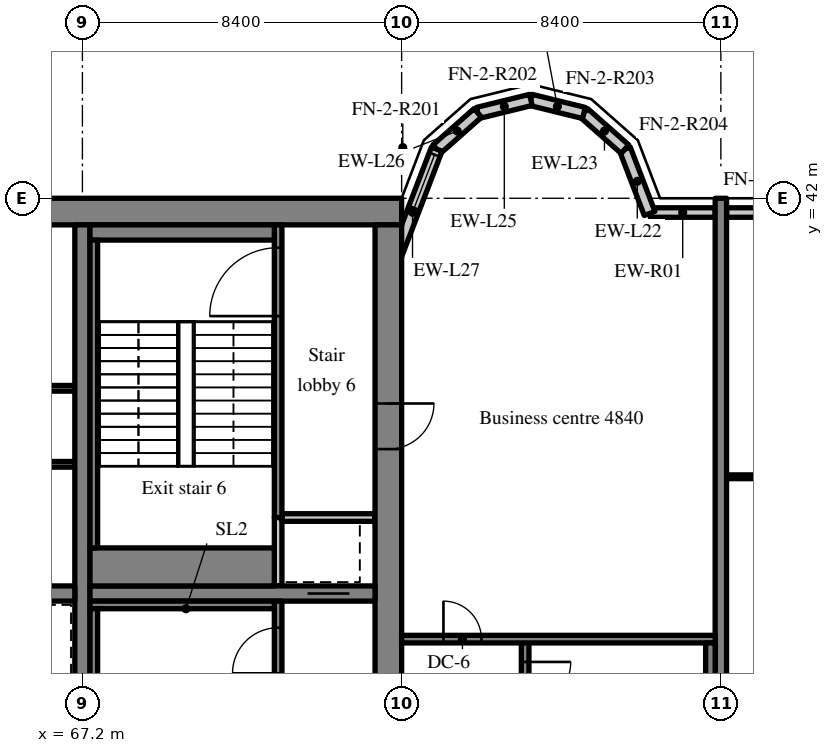
"""IFC4 building model, lengths in metres.
Left out: names, types, materials, properties, quantities, classifications, styles, units other than length and angle.
Written with IfcOpenShell. Run it as: python <this file> out.ifc"""

import sys

from ifc_helpers import new_model, si_unit, direction, frame, frame_2d, origin, place, context, subcontext, project, spatial, rectangle, extrude, source, transform, mapped, element, fill, save


model = new_model("IFC4")
c1 = context("Model", 3, precision=1e-05, world=origin(), true_north=direction((0.0, 1.0)))
c2 = subcontext(c1, "Body", "Model", "MODEL_VIEW")
j1 = project(units=[si_unit("LENGTHUNIT", "METRE"), si_unit("PLANEANGLEUNIT", "RADIAN")], contexts=[c1])
p1 = place(None, origin())
s1 = spatial("IfcSite", under=j1, at=p1, CompositionType="ELEMENT")
p2 = place(p1, origin())
s2 = spatial("IfcBuilding", under=s1, at=p2, CompositionType="ELEMENT")
p3 = place(p2, frame((0.0, 0.0, 197.2)))
s3 = spatial("IfcBuildingStorey", under=s2, at=p3, CompositionType="ELEMENT", Elevation=197.2)
m1 = source(origin(), c2, "Body", "SweptSolid", [
    extrude(rectangle(XDim=50.4, YDim=0.7, at=frame_2d((25.2, 0.0))), origin(), (0.0, 0.0, 1.0), 3.52),
])
p4 = place(p3, frame((25.2, 41.65, 0.0), z_axis=(0.0, 0.0, 1.0), x_axis=(1.0, 0.0, 0.0)))
e1 = element("IfcWall", 1, at=p4, inside=s3, PredefinedType="SHEAR", context=c2, shape_type="MappedRepresentation", body=[
    mapped(m1, transform((0.0, 0.0, 0.0), scale=1.0)),
])
m2 = source(origin(), c2, "Body", "SweptSolid", [
    extrude(rectangle(XDim=18.6, YDim=0.7, at=frame_2d((9.3, 0.0))), origin(), (0.0, 0.0, 1.0), 3.52),
])
p5 = place(p3, frame((75.25, 22.7, 0.0), z_axis=(0.0, 0.0, 1.0), x_axis=(0.0, 1.0, 0.0)))
e2 = element("IfcWall", 2, at=p5, inside=s3, PredefinedType="SHEAR", context=c2, shape_type="MappedRepresentation", body=[
    mapped(m2, transform((0.0, 0.0, 0.0), scale=1.0)),
])
m3 = source(origin(), c2, "Body", "SweptSolid", [
    extrude(rectangle(XDim=1.2, YDim=2.1, at=frame_2d((0.6, 1.05))), frame((0.0, 0.36, 0.0), z_axis=(0.0, -1.0, 0.0), x_axis=(1.0, 0.0, 0.0)), (0.0, 0.0, 1.0), 0.72),
])
p6 = place(p5, frame((12.7, 0.0, 0.0)))
e3 = element("IfcOpeningElement", 3, at=p6, cuts=e2, PredefinedType="OPENING", context=c2, shape_type="MappedRepresentation", body=[
    mapped(m3, transform((0.0, 0.0, 0.0), scale=1.0)),
])
m4 = source(origin(), c2, "Body", "SweptSolid", [
    extrude(rectangle(XDim=18.6, YDim=0.4, at=frame_2d((9.3, 0.0))), origin(), (0.0, 0.0, 1.0), 3.52),
])
p7 = place(p3, frame((67.2, 22.7, 0.0), z_axis=(0.0, 0.0, 1.0), x_axis=(0.0, 1.0, 0.0)))
e4 = element("IfcWall", 4, at=p7, inside=s3, PredefinedType="SHEAR", context=c2, shape_type="MappedRepresentation", body=[
    mapped(m4, transform((0.0, 0.0, 0.0), scale=1.0)),
])
m5 = source(origin(), c2, "Body", "SweptSolid", [
    extrude(rectangle(XDim=16.4, YDim=0.4, at=frame_2d((8.2, 0.0))), origin(), (0.0, 0.0, 1.0), 3.52),
])
p8 = place(p3, frame((50.6, 31.6, 0.0), z_axis=(0.0, 0.0, 1.0), x_axis=(1.0, 0.0, 0.0)))
e5 = element("IfcWall", 5, at=p8, inside=s3, PredefinedType="SHEAR", context=c2, shape_type="MappedRepresentation", body=[
    mapped(m5, transform((0.0, 0.0, 0.0), scale=1.0)),
])
m6 = source(origin(), c2, "Body", "SweptSolid", [
    extrude(rectangle(XDim=1.0, YDim=2.1, at=frame_2d((0.5, 1.05))), frame((0.0, 0.21, 0.0), z_axis=(0.0, -1.0, 0.0), x_axis=(1.0, 0.0, 0.0)), (0.0, 0.0, 1.0), 0.42),
])
p9 = place(p8, frame((0.6, 0.0, 0.0)))
e6 = element("IfcOpeningElement", 6, at=p9, cuts=e5, PredefinedType="OPENING", context=c2, shape_type="MappedRepresentation", body=[
    mapped(m6, transform((0.0, 0.0, 0.0), scale=1.0)),
])
m7 = source(origin(), c2, "Body", "SweptSolid", [
    extrude(rectangle(XDim=7.5, YDim=0.4, at=frame_2d((3.75, 0.0))), origin(), (0.0, 0.0, 1.0), 3.52),
])
p10 = place(p3, frame((67.4, 31.6, 0.0), z_axis=(0.0, 0.0, 1.0), x_axis=(1.0, 0.0, 0.0)))
e7 = element("IfcWall", 7, at=p10, inside=s3, PredefinedType="SHEAR", context=c2, shape_type="MappedRepresentation", body=[
    mapped(m7, transform((0.0, 0.0, 0.0), scale=1.0)),
])
m8 = source(origin(), c2, "Body", "SweptSolid", [
    extrude(rectangle(XDim=1.1, YDim=2.1, at=frame_2d((0.55, 1.05))), frame((0.0, 0.21, 0.0), z_axis=(0.0, -1.0, 0.0), x_axis=(1.0, 0.0, 0.0)), (0.0, 0.0, 1.0), 0.42),
])
p11 = place(p10, frame((5.725, 0.0, 0.0)))
e8 = element("IfcOpeningElement", 8, at=p11, cuts=e7, PredefinedType="OPENING", context=c2, shape_type="MappedRepresentation", body=[
    mapped(m8, transform((0.0, 0.0, 0.0), scale=1.0)),
])
m9 = source(origin(), c2, "Body", "SweptSolid", [
    extrude(rectangle(XDim=20.0, YDim=0.3, at=frame_2d((10.0, 0.0))), origin(), (0.0, 0.0, 1.0), 3.52),
])
p12 = place(p3, frame((84.0, 22.0, 0.0), z_axis=(0.0, 0.0, 1.0), x_axis=(0.0, 1.0, 0.0)))
e9 = element("IfcWall", 9, at=p12, inside=s3, PredefinedType="SHEAR", context=c2, shape_type="MappedRepresentation", body=[
    mapped(m9, transform((0.0, 0.0, 0.0), scale=1.0)),
])
m10 = source(origin(), c2, "Body", "SweptSolid", [
    extrude(rectangle(XDim=1.708, YDim=0.25, at=frame_2d((0.854, 0.0))), origin(), (0.0, 0.0, 1.0), 2.87),
])
p13 = place(p3, frame((83.85, 41.625, 0.0), z_axis=(0.0, 0.0, 1.0), x_axis=(-1.0, 0.0, 0.0)))
e10 = element("IfcWall", 10, at=p13, inside=s3, PredefinedType="SOLIDWALL", context=c2, shape_type="MappedRepresentation", body=[
    mapped(m10, transform((0.0, 0.0, 0.0), scale=1.0)),
])
m11 = source(origin(), c2, "Body", "SweptSolid", [
    extrude(rectangle(XDim=4.095, YDim=0.25, at=frame_2d((2.047, 0.0))), origin(), (0.0, 0.0, 1.0), 2.87),
])
p14 = place(p3, frame((88.245, 41.625, 0.0), z_axis=(0.0, 0.0, 1.0), x_axis=(-1.0, 0.0, 0.0)))
e11 = element("IfcWall", 11, at=p14, inside=s3, PredefinedType="SOLIDWALL", context=c2, shape_type="MappedRepresentation", body=[
    mapped(m11, transform((0.0, 0.0, 0.0), scale=1.0)),
])
m12 = source(origin(), c2, "Body", "SweptSolid", [
    extrude(rectangle(XDim=1.5, YDim=1.5, at=frame_2d((0.75, 0.75))), frame((0.0, 0.135, 0.0), z_axis=(0.0, -1.0, 0.0), x_axis=(1.0, 0.0, 0.0)), (0.0, 0.0, 1.0), 0.27),
])
p15 = place(p14, frame((1.297, 0.0, 0.9)))
e12 = element("IfcOpeningElement", 12, at=p15, cuts=e11, PredefinedType="OPENING", context=c2, shape_type="MappedRepresentation", body=[
    mapped(m12, transform((0.0, 0.0, 0.0), scale=1.0)),
])
m13 = source(origin(), c2, "Body", "SweptSolid", [
    extrude(rectangle(XDim=1.812, YDim=0.3, at=frame_2d((0.906, 0.0))), origin(), (0.0, 0.0, 1.0), 3.52),
])
p16 = place(p3, frame((82.125, 41.6, 0.0), z_axis=(0.0, 0.0, 1.0), x_axis=(-0.357877270961, 0.93376863244, 0.0)))
e13 = element("IfcWall", 13, at=p16, inside=s3, PredefinedType="SOLIDWALL", context=c2, shape_type="MappedRepresentation", body=[
    mapped(m13, transform((0.0, 0.0, 0.0), scale=1.0)),
])
m14 = source(origin(), c2, "Body", "SweptSolid", [
    extrude(rectangle(XDim=1.44, YDim=0.3, at=frame_2d((0.72, 0.0))), origin(), (0.0, 0.0, 1.0), 3.52),
])
p17 = place(p3, frame((81.477, 43.292, 0.0), z_axis=(0.0, 0.0, 1.0), x_axis=(-0.74957555648, 0.661918790432, 0.0)))
e14 = element("IfcWall", 14, at=p17, inside=s3, PredefinedType="SOLIDWALL", context=c2, shape_type="MappedRepresentation", body=[
    mapped(m14, transform((0.0, 0.0, 0.0), scale=1.0)),
])
m15 = source(origin(), c2, "Body", "SweptSolid", [
    extrude(rectangle(XDim=1.439, YDim=0.3, at=frame_2d((0.719, 0.0))), origin(), (0.0, 0.0, 1.0), 3.52),
])
for number, where, z_axis, x_axis in (
    (15, (80.397, 44.245, 0.0), (0.0, 0.0, 1.0), (-0.971, 0.238, 0.0)),
    (16, (79.0, 44.588, 0.0), (0.0, 0.0, 1.0), (-0.971, -0.238, 0.0)),
):
    element("IfcWall", number, at=place(p3, frame(where, z_axis=z_axis, x_axis=x_axis)), inside=s3, PredefinedType="SOLIDWALL", context=c2, shape_type="MappedRepresentation", body=[
        mapped(m15, transform((0.0, 0.0, 0.0), scale=1.0)),
    ])
p18 = place(p3, frame((77.603, 44.245, 0.0), z_axis=(0.0, 0.0, 1.0), x_axis=(-0.74957555648, -0.661918790432, 0.0)))
e17 = element("IfcWall", 17, at=p18, inside=s3, PredefinedType="SOLIDWALL", context=c2, shape_type="MappedRepresentation", body=[
    mapped(m14, transform((0.0, 0.0, 0.0), scale=1.0)),
])
m16 = source(origin(), c2, "Body", "SweptSolid", [
    extrude(rectangle(XDim=3.559, YDim=0.3, at=frame_2d((1.78, 0.0))), origin(), (0.0, 0.0, 1.0), 3.52),
])
p19 = place(p3, frame((76.523, 43.292, 0.0), z_axis=(0.0, 0.0, 1.0), x_axis=(-0.35779745313, -0.933799219604, 0.0)))
e18 = element("IfcWall", 18, at=p19, inside=s3, PredefinedType="SOLIDWALL", context=c2, shape_type="MappedRepresentation", body=[
    mapped(m16, transform((0.0, 0.0, 0.0), scale=1.0)),
])
m17 = source(origin(), c2, "Body", "SweptSolid", [
    extrude(rectangle(XDim=1.5, YDim=2.0, at=frame_2d((0.75, 1.0))), frame((0.0, 0.16, 0.0), z_axis=(0.0, -1.0, 0.0), x_axis=(1.0, 0.0, 0.0)), (0.0, 0.0, 1.0), 0.32),
])
p20 = place(p19, frame((0.156, 0.0, 0.9)))
e19 = element("IfcOpeningElement", 19, at=p20, cuts=e18, PredefinedType="OPENING", context=c2, shape_type="MappedRepresentation", body=[
    mapped(m17, transform((0.0, 0.0, 0.0), scale=1.0)),
])
m18 = source(origin(), c2, "Body", "SweptSolid", [
    extrude(rectangle(XDim=14.2, YDim=0.15, at=frame_2d((7.1, 0.0))), origin(), (0.0, 0.0, 1.0), 3.52),
])
p21 = place(p3, frame((67.0, 35.0, 0.0), z_axis=(0.0, 0.0, 1.0), x_axis=(-1.0, 0.0, 0.0)))
e20 = element("IfcWall", 20, at=p21, inside=s3, PredefinedType="PARTITIONING", context=c2, shape_type="MappedRepresentation", body=[
    mapped(m18, transform((0.0, 0.0, 0.0), scale=1.0)),
])
m19 = source(origin(), c2, "Body", "SweptSolid", [
    extrude(rectangle(XDim=0.9, YDim=2.1, at=frame_2d((0.45, 1.05))), frame((0.0, 0.085, 0.0), z_axis=(0.0, -1.0, 0.0), x_axis=(1.0, 0.0, 0.0)), (0.0, 0.0, 1.0), 0.17),
])
p22 = place(p21, frame((3.434, 0.0, 0.0)))
e21 = element("IfcOpeningElement", 21, at=p22, cuts=e20, PredefinedType="OPENING", context=c2, shape_type="MappedRepresentation", body=[
    mapped(m19, transform((0.0, 0.0, 0.0), scale=1.0)),
])
p23 = place(p21, frame((10.497, 0.0, 0.0)))
e22 = element("IfcOpeningElement", 22, at=p23, cuts=e20, PredefinedType="OPENING", context=c2, shape_type="MappedRepresentation", body=[
    mapped(m19, transform((0.0, 0.0, 0.0), scale=1.0)),
])
m20 = source(origin(), c2, "Body", "SweptSolid", [
    extrude(rectangle(XDim=16.4, YDim=0.15, at=frame_2d((8.2, 0.0))), origin(), (0.0, 0.0, 1.0), 3.52),
])
p24 = place(p3, frame((67.0, 37.0, 0.0), z_axis=(0.0, 0.0, 1.0), x_axis=(-1.0, 0.0, 0.0)))
e23 = element("IfcWall", 23, at=p24, inside=s3, PredefinedType="PARTITIONING", context=c2, shape_type="MappedRepresentation", body=[
    mapped(m20, transform((0.0, 0.0, 0.0), scale=1.0)),
])
p25 = place(p24, frame((6.52, 0.0, 0.0)))
e24 = element("IfcOpeningElement", 24, at=p25, cuts=e23, PredefinedType="OPENING", context=c2, shape_type="MappedRepresentation", body=[
    mapped(m19, transform((0.0, 0.0, 0.0), scale=1.0)),
])
p26 = place(p24, frame((14.72, 0.0, 0.0)))
e25 = element("IfcOpeningElement", 25, at=p26, cuts=e23, PredefinedType="OPENING", context=c2, shape_type="MappedRepresentation", body=[
    mapped(m19, transform((0.0, 0.0, 0.0), scale=1.0)),
])
m21 = source(origin(), c2, "Body", "SweptSolid", [
    extrude(rectangle(XDim=8.7, YDim=0.2, at=frame_2d((4.35, 0.0))), origin(), (0.0, 0.0, 1.0), 3.52),
])
p27 = place(p3, frame((72.35, 22.7, 0.0), z_axis=(0.0, 0.0, 1.0), x_axis=(0.0, 1.0, 0.0)))
e26 = element("IfcWall", 26, at=p27, inside=s3, PredefinedType="SOLIDWALL", context=c2, shape_type="MappedRepresentation", body=[
    mapped(m21, transform((0.0, 0.0, 0.0), scale=1.0)),
])
m22 = source(origin(), c2, "Body", "SweptSolid", [
    extrude(rectangle(XDim=1.2, YDim=2.1, at=frame_2d((0.6, 1.05))), frame((0.0, 0.11, 0.0), z_axis=(0.0, -1.0, 0.0), x_axis=(1.0, 0.0, 0.0)), (0.0, 0.0, 1.0), 0.22),
])
p28 = place(p27, frame((6.8, 0.0, 0.0)))
e27 = element("IfcOpeningElement", 27, at=p28, cuts=e26, PredefinedType="OPENING", context=c2, shape_type="MappedRepresentation", body=[
    mapped(m22, transform((0.0, 0.0, 0.0), scale=1.0)),
])
m23 = source(origin(), c2, "Body", "SweptSolid", [
    extrude(rectangle(XDim=1.8, YDim=0.2, at=frame_2d((0.9, 0.0))), origin(), (0.0, 0.0, 1.0), 3.52),
])
p29 = place(p3, frame((72.35, 31.8, 0.0), z_axis=(0.0, 0.0, 1.0), x_axis=(0.0, 1.0, 0.0)))
e28 = element("IfcWall", 28, at=p29, inside=s3, PredefinedType="SOLIDWALL", context=c2, shape_type="MappedRepresentation", body=[
    mapped(m23, transform((0.0, 0.0, 0.0), scale=1.0)),
])
m24 = source(origin(), c2, "Body", "SweptSolid", [
    extrude(rectangle(XDim=2.45, YDim=0.2, at=frame_2d((1.225, 0.0))), origin(), (0.0, 0.0, 1.0), 3.52),
])
p30 = place(p3, frame((72.45, 33.6, 0.0), z_axis=(0.0, 0.0, 1.0), x_axis=(1.0, 0.0, 0.0)))
e29 = element("IfcWall", 29, at=p30, inside=s3, PredefinedType="SOLIDWALL", context=c2, shape_type="MappedRepresentation", body=[
    mapped(m24, transform((0.0, 0.0, 0.0), scale=1.0)),
])
m25 = source(origin(), c2, "Body", "SweptSolid", [
    extrude(rectangle(XDim=7.7, YDim=0.2, at=frame_2d((3.85, 0.0))), origin(), (0.0, 0.0, 1.0), 3.52),
])
p31 = place(p3, frame((72.35, 33.6, 0.0), z_axis=(0.0, 0.0, 1.0), x_axis=(0.0, 1.0, 0.0)))
e30 = element("IfcWall", 30, at=p31, inside=s3, PredefinedType="SOLIDWALL", context=c2, shape_type="MappedRepresentation", body=[
    mapped(m25, transform((0.0, 0.0, 0.0), scale=1.0)),
])
m26 = source(origin(), c2, "Body", "SweptSolid", [
    extrude(rectangle(XDim=1.8, YDim=2.1, at=frame_2d((0.9, 1.05))), frame((0.0, 0.11, 0.0), z_axis=(0.0, -1.0, 0.0), x_axis=(1.0, 0.0, 0.0)), (0.0, 0.0, 1.0), 0.22),
])
p32 = place(p31, frame((5.3, 0.0, 0.0)))
e31 = element("IfcOpeningElement", 31, at=p32, cuts=e30, PredefinedType="OPENING", context=c2, shape_type="MappedRepresentation", body=[
    mapped(m26, transform((0.0, 0.0, 0.0), scale=1.0)),
])
m27 = source(origin(), c2, "Body", "SweptSolid", [
    extrude(rectangle(XDim=8.3, YDim=0.2, at=frame_2d((4.15, 0.0))), origin(), (0.0, 0.0, 1.0), 3.52),
])
p33 = place(p3, frame((78.85, 22.1, 0.0), z_axis=(0.0, 0.0, 1.0), x_axis=(0.0, 1.0, 0.0)))
e32 = element("IfcWall", 32, at=p33, inside=s3, PredefinedType="SOLIDWALL", context=c2, shape_type="MappedRepresentation", body=[
    mapped(m27, transform((0.0, 0.0, 0.0), scale=1.0)),
])
p34 = place(p33, frame((6.5, 0.0, 0.0)))
e33 = element("IfcOpeningElement", 33, at=p34, cuts=e32, PredefinedType="OPENING", context=c2, shape_type="MappedRepresentation", body=[
    mapped(m22, transform((0.0, 0.0, 0.0), scale=1.0)),
])
m28 = source(origin(), c2, "Body", "SweptSolid", [
    extrude(rectangle(XDim=8.25, YDim=0.2, at=frame_2d((4.125, 0.0))), origin(), (0.0, 0.0, 1.0), 3.52),
])
p35 = place(p3, frame((83.85, 30.4, 0.0), z_axis=(0.0, 0.0, 1.0), x_axis=(-1.0, 0.0, 0.0)))
e34 = element("IfcWall", 34, at=p35, inside=s3, PredefinedType="SOLIDWALL", context=c2, shape_type="MappedRepresentation", body=[
    mapped(m28, transform((0.0, 0.0, 0.0), scale=1.0)),
])
m29 = source(origin(), c2, "Body", "SweptSolid", [
    extrude(rectangle(XDim=1.0, YDim=2.1, at=frame_2d((0.5, 1.05))), frame((0.0, 0.11, 0.0), z_axis=(0.0, -1.0, 0.0), x_axis=(1.0, 0.0, 0.0)), (0.0, 0.0, 1.0), 0.22),
])
p36 = place(p35, frame((6.15, 0.0, 0.0)))
e35 = element("IfcOpeningElement", 35, at=p36, cuts=e34, PredefinedType="OPENING", context=c2, shape_type="MappedRepresentation", body=[
    mapped(m29, transform((0.0, 0.0, 0.0), scale=1.0)),
])
m30 = source(origin(), c2, "Body", "SweptSolid", [
    extrude(rectangle(XDim=4.85, YDim=0.2, at=frame_2d((2.425, 0.0))), origin(), (0.0, 0.0, 1.0), 3.52),
])
p37 = place(p3, frame((67.4, 31.3, 0.0), z_axis=(0.0, 0.0, 1.0), x_axis=(1.0, 0.0, 0.0)))
e36 = element("IfcWall", 36, at=p37, inside=s3, PredefinedType="SOLIDWALL", context=c2, shape_type="MappedRepresentation", body=[
    mapped(m30, transform((0.0, 0.0, 0.0), scale=1.0)),
])
m31 = source(origin(), c2, "Body", "SweptSolid", [
    extrude(rectangle(XDim=8.1, YDim=0.2, at=frame_2d((4.05, 0.0))), origin(), (0.0, 0.0, 1.0), 3.52),
])
p38 = place(p3, frame((67.5, 23.1, 0.0), z_axis=(0.0, 0.0, 1.0), x_axis=(0.0, 1.0, 0.0)))
e37 = element("IfcWall", 37, at=p38, inside=s3, PredefinedType="SOLIDWALL", context=c2, shape_type="MappedRepresentation", body=[
    mapped(m31, transform((0.0, 0.0, 0.0), scale=1.0)),
])
m32 = source(origin(), c2, "Body", "SweptSolid", [
    extrude(rectangle(XDim=4.85, YDim=0.4, at=frame_2d((2.425, 0.0))), origin(), (0.0, 0.0, 1.0), 3.52),
])
p39 = place(p3, frame((67.4, 41.1, 0.0), z_axis=(0.0, 0.0, 1.0), x_axis=(1.0, 0.0, 0.0)))
e38 = element("IfcWall", 38, at=p39, inside=s3, PredefinedType="SOLIDWALL", context=c2, shape_type="MappedRepresentation", body=[
    mapped(m32, transform((0.0, 0.0, 0.0), scale=1.0)),
])
m33 = source(origin(), c2, "Body", "SweptSolid", [
    extrude(rectangle(XDim=4.85, YDim=1.0, at=frame_2d((2.425, 0.0))), origin(), (0.0, 0.0, 1.0), 3.52),
])
p40 = place(p3, frame((67.4, 32.3, 0.0), z_axis=(0.0, 0.0, 1.0), x_axis=(1.0, 0.0, 0.0)))
e39 = element("IfcWall", 39, at=p40, inside=s3, PredefinedType="SOLIDWALL", context=c2, shape_type="MappedRepresentation", body=[
    mapped(m33, transform((0.0, 0.0, 0.0), scale=1.0)),
])
p41 = place(p3, frame((67.5, 32.8, 0.0), z_axis=(0.0, 0.0, 1.0), x_axis=(0.0, 1.0, 0.0)))
e40 = element("IfcWall", 40, at=p41, inside=s3, PredefinedType="SOLIDWALL", context=c2, shape_type="MappedRepresentation", body=[
    mapped(m31, transform((0.0, 0.0, 0.0), scale=1.0)),
])
m34 = source(origin(), c2, "Body", "SweptSolid", [
    extrude(rectangle(XDim=8.1, YDim=0.25, at=frame_2d((4.05, 0.0))), origin(), (0.0, 0.0, 1.0), 3.52),
])
p42 = place(p3, frame((83.725, 22.2, 0.0), z_axis=(0.0, 0.0, 1.0), x_axis=(0.0, 1.0, 0.0)))
e41 = element("IfcWall", 41, at=p42, inside=s3, PredefinedType="SOLIDWALL", context=c2, shape_type="MappedRepresentation", body=[
    mapped(m34, transform((0.0, 0.0, 0.0), scale=1.0)),
])
m35 = source(origin(), c2, "Body", "SweptSolid", [
    extrude(rectangle(XDim=7.95, YDim=0.1, at=frame_2d((3.975, 0.0))), origin(), (0.0, 0.0, 1.0), 3.52),
])
p43 = place(p3, frame((84.15, 34.672, 0.0), z_axis=(0.0, 0.0, 1.0), x_axis=(1.0, 0.0, 0.0)))
e42 = element("IfcWall", 42, at=p43, inside=s3, PredefinedType="PARTITIONING", context=c2, shape_type="MappedRepresentation", body=[
    mapped(m35, transform((0.0, 0.0, 0.0), scale=1.0)),
])
m36 = source(origin(), c2, "Body", "SweptSolid", [
    extrude(rectangle(XDim=1.8, YDim=2.1, at=frame_2d((0.9, 1.05))), frame((0.0, 0.06, 0.0), z_axis=(0.0, -1.0, 0.0), x_axis=(1.0, 0.0, 0.0)), (0.0, 0.0, 1.0), 0.12),
])
p44 = place(p43, frame((3.075, 0.0, 0.0)))
e43 = element("IfcOpeningElement", 43, at=p44, cuts=e42, PredefinedType="OPENING", context=c2, shape_type="MappedRepresentation", body=[
    mapped(m36, transform((0.0, 0.0, 0.0), scale=1.0)),
])
m37 = source(origin(), c2, "Body", "SweptSolid", [
    extrude(rectangle(XDim=1.5, YDim=2.0, at=frame_2d((0.75, 1.0))), frame((0.0, 0.03, 0.0), z_axis=(0.0, -1.0, 0.0), x_axis=(1.0, 0.0, 0.0)), (0.0, 0.0, 1.0), 0.06),
])
p45 = place(p20, origin())
e44 = element("IfcWindow", 44, at=p45, inside=s3, PartitioningType="SINGLE_PANEL", PredefinedType="WINDOW", context=c2, shape_type="MappedRepresentation", body=[
    mapped(m37, transform((0.0, 0.0, 0.0), scale=1.0)),
])
fill(e19, e44)
m38 = source(origin(), c2, "Body", "SweptSolid", [
    extrude(rectangle(XDim=1.2, YDim=2.1, at=frame_2d((0.6, 1.05))), frame((0.0, 0.025, 0.0), z_axis=(0.0, -1.0, 0.0), x_axis=(1.0, 0.0, 0.0)), (0.0, 0.0, 1.0), 0.05),
])
p46 = place(p28, origin())
e45 = element("IfcDoor", 45, at=p46, inside=s3, OperationType="SINGLE_SWING_LEFT", PredefinedType="DOOR", context=c2, shape_type="MappedRepresentation", body=[
    mapped(m38, transform((0.0, 0.0, 0.0), scale=1.0)),
])
fill(e27, e45)
m39 = source(origin(), c2, "Body", "SweptSolid", [
    extrude(rectangle(XDim=1.1, YDim=2.1, at=frame_2d((0.55, 1.05))), frame((0.0, 0.025, 0.0), z_axis=(0.0, -1.0, 0.0), x_axis=(1.0, 0.0, 0.0)), (0.0, 0.0, 1.0), 0.05),
])
p47 = place(p11, origin())
e46 = element("IfcDoor", 46, at=p47, inside=s3, OperationType="SLIDING_TO_RIGHT", PredefinedType="DOOR", context=c2, shape_type="MappedRepresentation", body=[
    mapped(m39, transform((0.0, 0.0, 0.0), scale=1.0)),
])
fill(e8, e46)
m40 = source(origin(), c2, "Body", "SweptSolid", [
    extrude(rectangle(XDim=1.8, YDim=2.1, at=frame_2d((0.9, 1.05))), frame((0.0, 0.025, 0.0), z_axis=(0.0, -1.0, 0.0), x_axis=(1.0, 0.0, 0.0)), (0.0, 0.0, 1.0), 0.05),
])
p48 = place(p32, origin())
e47 = element("IfcDoor", 47, at=p48, inside=s3, OperationType="SINGLE_SWING_LEFT", PredefinedType="DOOR", context=c2, shape_type="MappedRepresentation", body=[
    mapped(m40, transform((0.0, 0.0, 0.0), scale=1.0)),
])
fill(e31, e47)
p49 = place(p6, origin())
e48 = element("IfcDoor", 48, at=p49, inside=s3, OperationType="SINGLE_SWING_RIGHT", PredefinedType="DOOR", context=c2, shape_type="MappedRepresentation", body=[
    mapped(m38, transform((0.0, 0.0, 0.0), scale=1.0)),
])
fill(e3, e48)
p50 = place(p34, origin())
e49 = element("IfcDoor", 49, at=p50, inside=s3, OperationType="SINGLE_SWING_RIGHT", PredefinedType="DOOR", context=c2, shape_type="MappedRepresentation", body=[
    mapped(m38, transform((0.0, 0.0, 0.0), scale=1.0)),
])
fill(e33, e49)
m41 = source(origin(), c2, "Body", "SweptSolid", [
    extrude(rectangle(XDim=1.0, YDim=2.1, at=frame_2d((0.5, 1.05))), frame((0.0, 0.025, 0.0), z_axis=(0.0, -1.0, 0.0), x_axis=(1.0, 0.0, 0.0)), (0.0, 0.0, 1.0), 0.05),
])
p51 = place(p36, origin())
e50 = element("IfcDoor", 50, at=p51, inside=s3, OperationType="SINGLE_SWING_RIGHT", PredefinedType="DOOR", context=c2, shape_type="MappedRepresentation", body=[
    mapped(m41, transform((0.0, 0.0, 0.0), scale=1.0)),
])
fill(e35, e50)
save(model, sys.argv[1])
